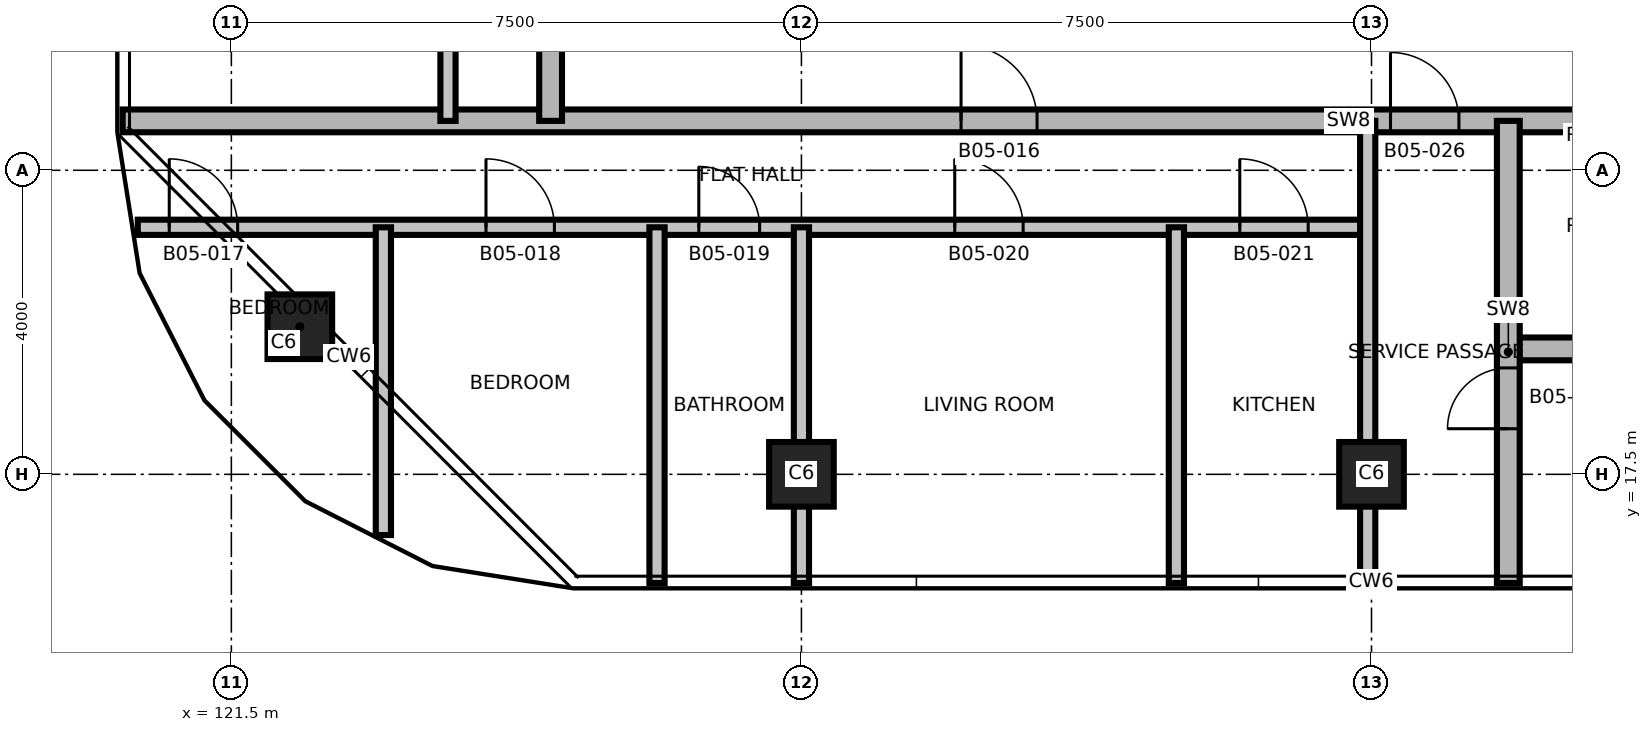
"""IFC4 building model, lengths in metres.
Left out: names, types, materials, properties, quantities, classifications, styles, units other than length and angle.
Written with IfcOpenShell. Run it as: python <this file> out.ifc"""

import sys

from ifc_helpers import new_model, si_unit, direction, frame, frame_2d, origin, origin_2d, place, context, subcontext, project, spatial, rectangle, extrude, element, fill, save


model = new_model("IFC4")
c1 = context("Model", 3, precision=1e-05, world=origin(), true_north=direction((0.0, 1.0)))
c2 = subcontext(c1, "Body", "Model", "MODEL_VIEW")
j1 = project(units=[si_unit("LENGTHUNIT", "METRE"), si_unit("PLANEANGLEUNIT", "RADIAN")], contexts=[c1])
p1 = place(None, origin())
s1 = spatial("IfcSite", under=j1, at=p1, CompositionType="ELEMENT")
p2 = place(p1, origin())
s2 = spatial("IfcBuilding", under=s1, at=p2, CompositionType="ELEMENT")
p3 = place(p2, frame((0.0, 0.0, 74.2)))
s3 = spatial("IfcBuildingStorey", under=s2, at=p3, CompositionType="ELEMENT", Elevation=74.2)
for number, where, z_axis, x_axis in (
    (1, (129.0, 17.5, 0.0), (0.0, 0.0, 1.0), (1.0, 0.0, 0.0)),
    (2, (136.5, 17.5, 0.0), (0.0, 0.0, 1.0), (1.0, 0.0, 0.0)),
    (3, (122.401, 19.442, 0.0), (0.0, 0.0, 1.0), (1.0, 0.0, 0.0)),
):
    element("IfcColumn", number, at=place(p3, frame(where, z_axis=z_axis, x_axis=x_axis)), inside=s3, PredefinedType="COLUMN", context=c2, shape_type="SweptSolid", body=[
        extrude(rectangle(XDim=0.85, YDim=0.85, at=origin_2d()), origin(), (0.0, 0.0, 1.0), 3.7),
    ])
p4 = place(p3, frame((138.25, 19.15, 0.0), z_axis=(0.0, 0.0, 1.0), x_axis=(1.0, 0.0, 0.0)))
e4 = element("IfcWall", 4, at=p4, inside=s3, PredefinedType="SHEAR", context=c2, shape_type="SweptSolid", body=[
    extrude(rectangle(XDim=5.75, YDim=0.3, at=frame_2d((2.875, 0.0))), origin(), (0.0, 0.0, 1.0), 3.4),
])
p5 = place(p3, frame((120.269, 20.75, 0.0), z_axis=(0.0, 0.0, 1.0), x_axis=(1.0, 0.0, 0.0)))
e5 = element("IfcWall", 5, at=p5, inside=s3, PredefinedType="PARTITIONING", context=c2, shape_type="SweptSolid", body=[
    extrude(rectangle(XDim=16.231, YDim=0.2, at=frame_2d((8.115, 0.0))), origin(), (0.0, 0.0, 1.0), 3.4),
])
p6 = place(p5, frame((0.414, 0.0, 0.0)))
e6 = element("IfcOpeningElement", 6, at=p6, cuts=e5, PredefinedType="OPENING", context=c2, shape_type="SweptSolid", body=[
    extrude(rectangle(XDim=0.9, YDim=2.1, at=frame_2d((0.45, 1.05))), frame((0.0, 0.11, 0.0), z_axis=(0.0, -1.0, 0.0), x_axis=(1.0, 0.0, 0.0)), (0.0, 0.0, 1.0), 0.22),
])
p7 = place(p5, frame((4.581, 0.0, 0.0)))
e7 = element("IfcOpeningElement", 7, at=p7, cuts=e5, PredefinedType="OPENING", context=c2, shape_type="SweptSolid", body=[
    extrude(rectangle(XDim=0.9, YDim=2.1, at=frame_2d((0.45, 1.05))), frame((0.0, 0.11, 0.0), z_axis=(0.0, -1.0, 0.0), x_axis=(1.0, 0.0, 0.0)), (0.0, 0.0, 1.0), 0.22),
])
p8 = place(p5, frame((7.381, 0.0, 0.0)))
e8 = element("IfcOpeningElement", 8, at=p8, cuts=e5, PredefinedType="OPENING", context=c2, shape_type="SweptSolid", body=[
    extrude(rectangle(XDim=0.8, YDim=2.1, at=frame_2d((0.4, 1.05))), frame((0.0, 0.11, 0.0), z_axis=(0.0, -1.0, 0.0), x_axis=(1.0, 0.0, 0.0)), (0.0, 0.0, 1.0), 0.22),
])
p9 = place(p5, frame((10.748, 0.0, 0.0)))
e9 = element("IfcOpeningElement", 9, at=p9, cuts=e5, PredefinedType="OPENING", context=c2, shape_type="SweptSolid", body=[
    extrude(rectangle(XDim=0.9, YDim=2.1, at=frame_2d((0.45, 1.05))), frame((0.0, 0.11, 0.0), z_axis=(0.0, -1.0, 0.0), x_axis=(1.0, 0.0, 0.0)), (0.0, 0.0, 1.0), 0.22),
])
p10 = place(p5, frame((14.498, 0.0, 0.0)))
e10 = element("IfcOpeningElement", 10, at=p10, cuts=e5, PredefinedType="OPENING", context=c2, shape_type="SweptSolid", body=[
    extrude(rectangle(XDim=0.9, YDim=2.1, at=frame_2d((0.45, 1.05))), frame((0.0, 0.11, 0.0), z_axis=(0.0, -1.0, 0.0), x_axis=(1.0, 0.0, 0.0)), (0.0, 0.0, 1.0), 0.22),
])
p11 = place(p3, frame((120.07, 22.15, 0.0), z_axis=(0.0, 0.0, 1.0), x_axis=(1.0, 0.0, 0.0)))
e11 = element("IfcWall", 11, at=p11, inside=s3, PredefinedType="SHEAR", context=c2, shape_type="SweptSolid", body=[
    extrude(rectangle(XDim=32.86, YDim=0.3, at=frame_2d((16.43, 0.0))), origin(), (0.0, 0.0, 1.0), 3.4),
])
p12 = place(p11, frame((22.68, 0.0, 0.0)))
e12 = element("IfcOpeningElement", 12, at=p12, cuts=e11, PredefinedType="OPENING", context=c2, shape_type="SweptSolid", body=[
    extrude(rectangle(XDim=1.0, YDim=2.1, at=frame_2d((0.5, 1.05))), frame((0.0, 0.16, 0.0), z_axis=(0.0, -1.0, 0.0), x_axis=(1.0, 0.0, 0.0)), (0.0, 0.0, 1.0), 0.32),
])
p13 = place(p11, frame((11.03, 0.0, 0.0)))
e13 = element("IfcOpeningElement", 13, at=p13, cuts=e11, PredefinedType="OPENING", context=c2, shape_type="SweptSolid", body=[
    extrude(rectangle(XDim=1.0, YDim=2.1, at=frame_2d((0.5, 1.05))), frame((0.0, 0.16, 0.0), z_axis=(0.0, -1.0, 0.0), x_axis=(1.0, 0.0, 0.0)), (0.0, 0.0, 1.0), 0.32),
])
p14 = place(p11, frame((24.58, 0.0, 0.0)))
e14 = element("IfcOpeningElement", 14, at=p14, cuts=e11, PredefinedType="OPENING", context=c2, shape_type="SweptSolid", body=[
    extrude(rectangle(XDim=1.0, YDim=2.1, at=frame_2d((0.5, 1.05))), frame((0.0, 0.16, 0.0), z_axis=(0.0, -1.0, 0.0), x_axis=(1.0, 0.0, 0.0)), (0.0, 0.0, 1.0), 0.32),
])
p15 = place(p11, frame((16.68, 0.0, 0.0)))
e15 = element("IfcOpeningElement", 15, at=p15, cuts=e11, PredefinedType="OPENING", context=c2, shape_type="SweptSolid", body=[
    extrude(rectangle(XDim=0.9, YDim=2.1, at=frame_2d((0.45, 1.05))), frame((0.0, 0.16, 0.0), z_axis=(0.0, -1.0, 0.0), x_axis=(1.0, 0.0, 0.0)), (0.0, 0.0, 1.0), 0.32),
])
p16 = place(p3, frame((123.5, 16.701, 0.0), z_axis=(0.0, 0.0, 1.0), x_axis=(0.0, 1.0, 0.0)))
e16 = element("IfcWall", 16, at=p16, inside=s3, PredefinedType="PARTITIONING", context=c2, shape_type="SweptSolid", body=[
    extrude(rectangle(XDim=4.049, YDim=0.2, at=frame_2d((2.024, 0.0))), origin(), (0.0, 0.0, 1.0), 3.4),
])
p17 = place(p3, frame((124.35, 22.15, 0.0), z_axis=(0.0, 0.0, 1.0), x_axis=(0.0, 1.0, 0.0)))
e17 = element("IfcWall", 17, at=p17, inside=s3, PredefinedType="PARTITIONING", context=c2, shape_type="SweptSolid", body=[
    extrude(rectangle(XDim=17.7, YDim=0.2, at=frame_2d((8.85, 0.0))), origin(), (0.0, 0.0, 1.0), 3.4),
])
p18 = place(p17, frame((1.028, 0.0, 0.0)))
e18 = element("IfcOpeningElement", 18, at=p18, cuts=e17, PredefinedType="OPENING", context=c2, shape_type="SweptSolid", body=[
    extrude(rectangle(XDim=0.9, YDim=2.1, at=frame_2d((0.45, 1.05))), frame((0.0, 0.11, 0.0), z_axis=(0.0, -1.0, 0.0), x_axis=(1.0, 0.0, 0.0)), (0.0, 0.0, 1.0), 0.22),
])
p19 = place(p17, frame((3.253, 0.0, 0.0)))
e19 = element("IfcOpeningElement", 19, at=p19, cuts=e17, PredefinedType="OPENING", context=c2, shape_type="SweptSolid", body=[
    extrude(rectangle(XDim=0.8, YDim=2.1, at=frame_2d((0.4, 1.05))), frame((0.0, 0.11, 0.0), z_axis=(0.0, -1.0, 0.0), x_axis=(1.0, 0.0, 0.0)), (0.0, 0.0, 1.0), 0.22),
])
p20 = place(p17, frame((6.195, 0.0, 0.0)))
e20 = element("IfcOpeningElement", 20, at=p20, cuts=e17, PredefinedType="OPENING", context=c2, shape_type="SweptSolid", body=[
    extrude(rectangle(XDim=0.9, YDim=2.1, at=frame_2d((0.45, 1.05))), frame((0.0, 0.11, 0.0), z_axis=(0.0, -1.0, 0.0), x_axis=(1.0, 0.0, 0.0)), (0.0, 0.0, 1.0), 0.22),
])
p21 = place(p17, frame((9.641, 0.0, 0.0)))
e21 = element("IfcOpeningElement", 21, at=p21, cuts=e17, PredefinedType="OPENING", context=c2, shape_type="SweptSolid", body=[
    extrude(rectangle(XDim=0.9, YDim=2.1, at=frame_2d((0.45, 1.05))), frame((0.0, 0.11, 0.0), z_axis=(0.0, -1.0, 0.0), x_axis=(1.0, 0.0, 0.0)), (0.0, 0.0, 1.0), 0.22),
])
p22 = place(p17, frame((11.895, 0.0, 0.0)))
e22 = element("IfcOpeningElement", 22, at=p22, cuts=e17, PredefinedType="OPENING", context=c2, shape_type="SweptSolid", body=[
    extrude(rectangle(XDim=0.8, YDim=2.1, at=frame_2d((0.4, 1.05))), frame((0.0, 0.11, 0.0), z_axis=(0.0, -1.0, 0.0), x_axis=(1.0, 0.0, 0.0)), (0.0, 0.0, 1.0), 0.22),
])
p23 = place(p17, frame((15.075, 0.0, 0.0)))
e23 = element("IfcOpeningElement", 23, at=p23, cuts=e17, PredefinedType="OPENING", context=c2, shape_type="SweptSolid", body=[
    extrude(rectangle(XDim=0.9, YDim=2.1, at=frame_2d((0.45, 1.05))), frame((0.0, 0.11, 0.0), z_axis=(0.0, -1.0, 0.0), x_axis=(1.0, 0.0, 0.0)), (0.0, 0.0, 1.0), 0.22),
])
p24 = place(p3, frame((125.7, 22.15, 0.0), z_axis=(0.0, 0.0, 1.0), x_axis=(0.0, 1.0, 0.0)))
e24 = element("IfcWall", 24, at=p24, inside=s3, PredefinedType="SHEAR", context=c2, shape_type="SweptSolid", body=[
    extrude(rectangle(XDim=17.7, YDim=0.3, at=frame_2d((8.85, 0.0))), origin(), (0.0, 0.0, 1.0), 3.4),
])
p25 = place(p24, frame((2.7, 0.0, 0.0)))
e25 = element("IfcOpeningElement", 25, at=p25, cuts=e24, PredefinedType="OPENING", context=c2, shape_type="SweptSolid", body=[
    extrude(rectangle(XDim=1.0, YDim=2.1, at=frame_2d((0.5, 1.05))), frame((0.0, 0.16, 0.0), z_axis=(0.0, -1.0, 0.0), x_axis=(1.0, 0.0, 0.0)), (0.0, 0.0, 1.0), 0.32),
])
for number, where, z_axis, x_axis in (
    (26, (127.1, 16.07, 0.0), (0.0, 0.0, 1.0), (0.0, 1.0, 0.0)),
    (27, (129.0, 16.07, 0.0), (0.0, 0.0, 1.0), (0.0, 1.0, 0.0)),
    (28, (133.933, 16.07, 0.0), (0.0, 0.0, 1.0), (0.0, 1.0, 0.0)),
):
    element("IfcWall", number, at=place(p3, frame(where, z_axis=z_axis, x_axis=x_axis)), inside=s3, PredefinedType="PARTITIONING", context=c2, shape_type="SweptSolid", body=[
        extrude(rectangle(XDim=4.68, YDim=0.2, at=frame_2d((2.34, 0.0))), origin(), (0.0, 0.0, 1.0), 3.4),
    ])
p26 = place(p3, frame((136.45, 16.07, 0.0), z_axis=(0.0, 0.0, 1.0), x_axis=(0.0, 1.0, 0.0)))
e29 = element("IfcWall", 29, at=p26, inside=s3, PredefinedType="PARTITIONING", context=c2, shape_type="SweptSolid", body=[
    extrude(rectangle(XDim=6.08, YDim=0.2, at=frame_2d((3.04, 0.0))), origin(), (0.0, 0.0, 1.0), 3.4),
])
p27 = place(p3, frame((138.3, 16.07, 0.0), z_axis=(0.0, 0.0, 1.0), x_axis=(0.0, 1.0, 0.0)))
e30 = element("IfcWall", 30, at=p27, inside=s3, PredefinedType="SHEAR", context=c2, shape_type="SweptSolid", body=[
    extrude(rectangle(XDim=6.08, YDim=0.3, at=frame_2d((3.04, 0.0))), origin(), (0.0, 0.0, 1.0), 3.4),
])
p28 = place(p27, frame((2.03, 0.0, 0.0)))
e31 = element("IfcOpeningElement", 31, at=p28, cuts=e30, PredefinedType="OPENING", context=c2, shape_type="SweptSolid", body=[
    extrude(rectangle(XDim=0.8, YDim=2.1, at=frame_2d((0.4, 1.05))), frame((0.0, 0.16, 0.0), z_axis=(0.0, -1.0, 0.0), x_axis=(1.0, 0.0, 0.0)), (0.0, 0.0, 1.0), 0.32),
])
p29 = place(p13, origin())
e32 = element("IfcDoor", 32, at=p29, inside=s3, OperationType="SINGLE_SWING_RIGHT", PredefinedType="DOOR", context=c2, shape_type="SweptSolid", body=[
    extrude(rectangle(XDim=1.0, YDim=2.1, at=frame_2d((0.5, 1.05))), frame((0.0, 0.025, 0.0), z_axis=(0.0, -1.0, 0.0), x_axis=(1.0, 0.0, 0.0)), (0.0, 0.0, 1.0), 0.05),
])
fill(e13, e32)
p30 = place(p6, origin())
e33 = element("IfcDoor", 33, at=p30, inside=s3, OperationType="SINGLE_SWING_LEFT", PredefinedType="DOOR", context=c2, shape_type="SweptSolid", body=[
    extrude(rectangle(XDim=0.9, YDim=2.1, at=frame_2d((0.45, 1.05))), frame((0.0, 0.025, 0.0), z_axis=(0.0, -1.0, 0.0), x_axis=(1.0, 0.0, 0.0)), (0.0, 0.0, 1.0), 0.05),
])
fill(e6, e33)
p31 = place(p7, origin())
e34 = element("IfcDoor", 34, at=p31, inside=s3, OperationType="SINGLE_SWING_RIGHT", PredefinedType="DOOR", context=c2, shape_type="SweptSolid", body=[
    extrude(rectangle(XDim=0.9, YDim=2.1, at=frame_2d((0.45, 1.05))), frame((0.0, 0.025, 0.0), z_axis=(0.0, -1.0, 0.0), x_axis=(1.0, 0.0, 0.0)), (0.0, 0.0, 1.0), 0.05),
])
fill(e7, e34)
p32 = place(p8, origin())
e35 = element("IfcDoor", 35, at=p32, inside=s3, OperationType="SINGLE_SWING_LEFT", PredefinedType="DOOR", context=c2, shape_type="SweptSolid", body=[
    extrude(rectangle(XDim=0.8, YDim=2.1, at=frame_2d((0.4, 1.05))), frame((0.0, 0.025, 0.0), z_axis=(0.0, -1.0, 0.0), x_axis=(1.0, 0.0, 0.0)), (0.0, 0.0, 1.0), 0.05),
])
fill(e8, e35)
p33 = place(p9, origin())
e36 = element("IfcDoor", 36, at=p33, inside=s3, OperationType="SINGLE_SWING_RIGHT", PredefinedType="DOOR", context=c2, shape_type="SweptSolid", body=[
    extrude(rectangle(XDim=0.9, YDim=2.1, at=frame_2d((0.45, 1.05))), frame((0.0, 0.025, 0.0), z_axis=(0.0, -1.0, 0.0), x_axis=(1.0, 0.0, 0.0)), (0.0, 0.0, 1.0), 0.05),
])
fill(e9, e36)
p34 = place(p10, origin())
e37 = element("IfcDoor", 37, at=p34, inside=s3, OperationType="SINGLE_SWING_LEFT", PredefinedType="DOOR", context=c2, shape_type="SweptSolid", body=[
    extrude(rectangle(XDim=0.9, YDim=2.1, at=frame_2d((0.45, 1.05))), frame((0.0, 0.025, 0.0), z_axis=(0.0, -1.0, 0.0), x_axis=(1.0, 0.0, 0.0)), (0.0, 0.0, 1.0), 0.05),
])
fill(e10, e37)
p35 = place(p15, origin())
e38 = element("IfcDoor", 38, at=p35, inside=s3, OperationType="SINGLE_SWING_RIGHT", PredefinedType="DOOR", context=c2, shape_type="SweptSolid", body=[
    extrude(rectangle(XDim=0.9, YDim=2.1, at=frame_2d((0.45, 1.05))), frame((0.0, 0.025, 0.0), z_axis=(0.0, -1.0, 0.0), x_axis=(1.0, 0.0, 0.0)), (0.0, 0.0, 1.0), 0.05),
])
fill(e15, e38)
p36 = place(p28, origin())
e39 = element("IfcDoor", 39, at=p36, inside=s3, OperationType="SINGLE_SWING_LEFT", PredefinedType="DOOR", context=c2, shape_type="SweptSolid", body=[
    extrude(rectangle(XDim=0.8, YDim=2.1, at=frame_2d((0.4, 1.05))), frame((0.0, 0.025, 0.0), z_axis=(0.0, -1.0, 0.0), x_axis=(1.0, 0.0, 0.0)), (0.0, 0.0, 1.0), 0.05),
])
fill(e31, e39)
save(model, sys.argv[1])
